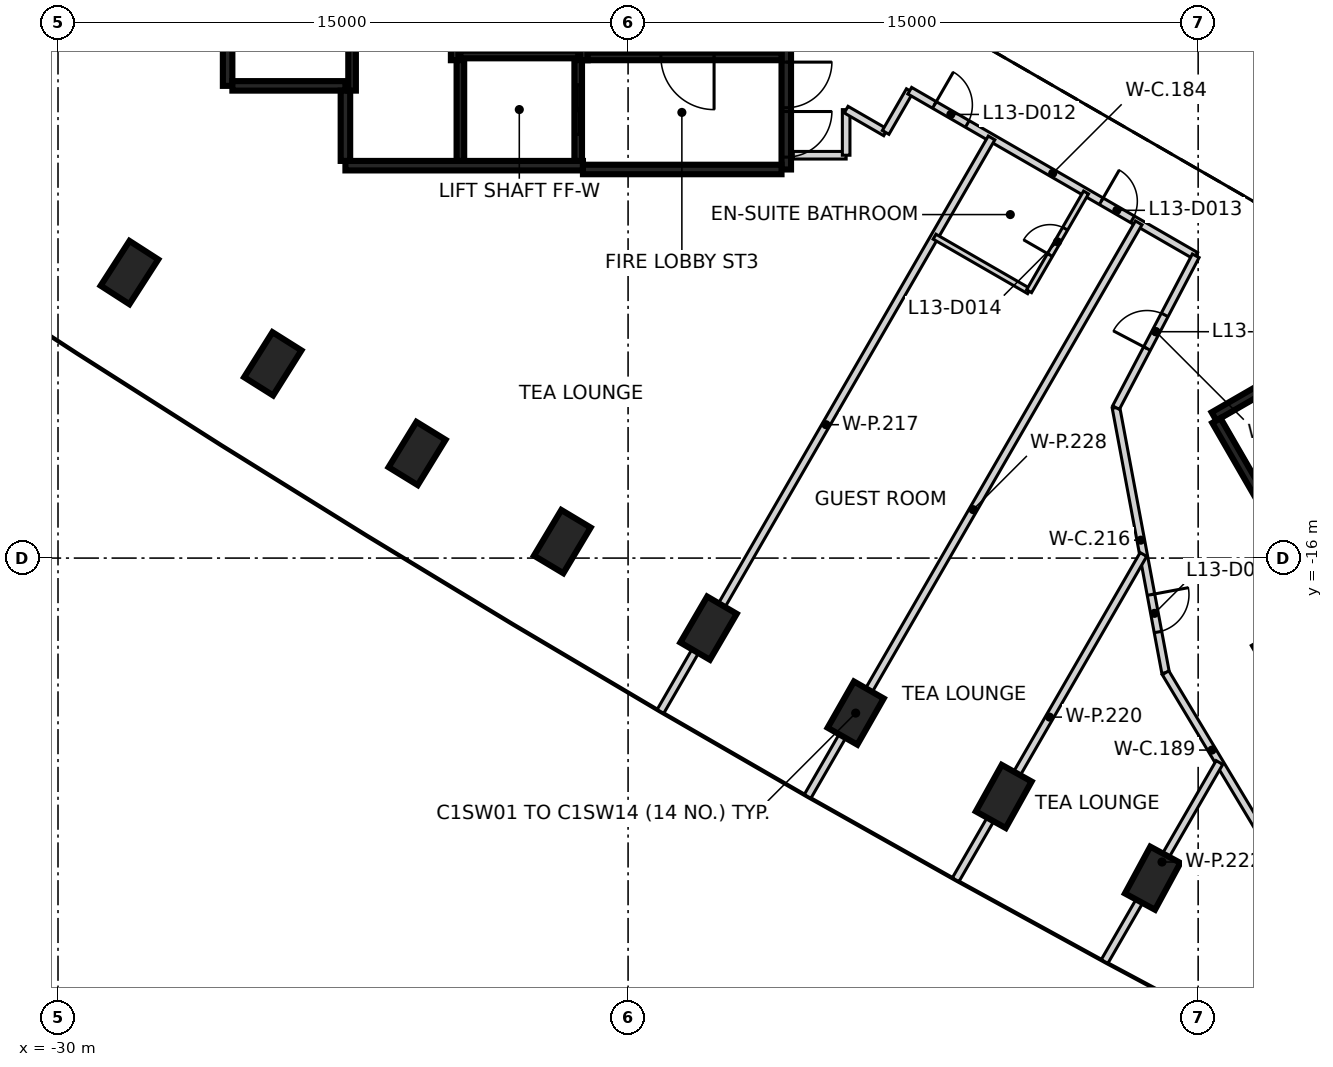
"""IFC4 building model, lengths in metres.
Left out: names, types, materials, properties, quantities, classifications, styles, units other than length and angle.
Written with IfcOpenShell. Run it as: python <this file> out.ifc"""

import sys

from ifc_helpers import new_model, si_unit, direction, frame, frame_2d, origin, origin_2d, place, context, subcontext, project, spatial, rectangle, extrude, element, fill, save


model = new_model("IFC4")
c1 = context("Model", 3, precision=1e-05, world=origin(), true_north=direction((0.0, 1.0)))
c2 = subcontext(c1, "Body", "Model", "MODEL_VIEW")
j1 = project(units=[si_unit("LENGTHUNIT", "METRE"), si_unit("PLANEANGLEUNIT", "RADIAN")], contexts=[c1])
p1 = place(None, origin())
s1 = spatial("IfcSite", under=j1, at=p1, CompositionType="ELEMENT")
p2 = place(p1, origin())
s2 = spatial("IfcBuilding", under=s1, at=p2, CompositionType="ELEMENT")
p3 = place(p2, frame((0.0, 0.0, 60.2)))
s3 = spatial("IfcBuildingStorey", under=s2, at=p3, CompositionType="ELEMENT", Elevation=60.2)
for number, where, z_axis, x_axis in (
    (1, (-28.12, -8.488, -0.475), (0.0, 0.0, 1.0), (0.541, 0.841, 0.0)),
    (2, (-24.349, -10.888, -0.475), (0.0, 0.0, 1.0), (0.532, 0.846, 0.0)),
    (3, (-20.552, -13.248, -0.475), (0.0, 0.0, 1.0), (0.523, 0.852, 0.0)),
    (4, (-16.73, -15.566, -0.475), (0.0, 0.0, 1.0), (0.514, 0.858, 0.0)),
    (5, (-12.883, -17.844, -0.475), (0.0, 0.0, 1.0), (0.505, 0.863, 0.0)),
    (6, (-9.011, -20.079, -0.475), (0.0, 0.0, 1.0), (0.495, 0.869, 0.0)),
    (7, (-5.116, -22.272, -0.475), (0.0, 0.0, 1.0), (0.486, 0.874, 0.0)),
    (8, (-1.197, -24.423, -0.475), (0.0, 0.0, 1.0), (0.476, 0.879, 0.0)),
):
    element("IfcColumn", number, at=place(p3, frame(where, z_axis=z_axis, x_axis=x_axis)), inside=s3, PredefinedType="COLUMN", context=c2, shape_type="SweptSolid", body=[
        extrude(rectangle(XDim=1.4, YDim=0.9, at=origin_2d()), origin(), (0.0, 0.0, 1.0), 3.6),
    ])
p4 = place(p3, frame((-10.837, 5.775, 0.0), z_axis=(0.0, 0.0, 1.0), x_axis=(0.0, -1.0, 0.0)))
e9 = element("IfcWall", 9, at=p4, inside=s3, PredefinedType="SHEAR", context=c2, shape_type="SweptSolid", body=[
    extrude(rectangle(XDim=11.55, YDim=0.25, at=frame_2d((5.775, 0.0))), origin(), (0.0, 0.0, 1.0), 3.125),
])
p5 = place(p4, frame((10.025, 0.0, 0.0)))
e10 = element("IfcOpeningElement", 10, at=p5, cuts=e9, PredefinedType="OPENING", context=c2, shape_type="SweptSolid", body=[
    extrude(rectangle(XDim=1.2, YDim=2.1, at=frame_2d((0.6, 1.05))), frame((0.0, 0.135, 0.0), z_axis=(0.0, -1.0, 0.0), x_axis=(1.0, 0.0, 0.0)), (0.0, 0.0, 1.0), 0.27),
])
p6 = place(p4, frame((8.725, 0.0, 0.0)))
e11 = element("IfcOpeningElement", 11, at=p6, cuts=e9, PredefinedType="OPENING", context=c2, shape_type="SweptSolid", body=[
    extrude(rectangle(XDim=1.2, YDim=2.1, at=frame_2d((0.6, 1.05))), frame((0.0, 0.135, 0.0), z_axis=(0.0, -1.0, 0.0), x_axis=(1.0, 0.0, 0.0)), (0.0, 0.0, 1.0), 0.27),
])
p7 = place(p3, frame((-16.187, -5.675, 0.0), z_axis=(0.0, 0.0, 1.0), x_axis=(-1.0, 0.0, 0.0)))
e12 = element("IfcWall", 12, at=p7, inside=s3, PredefinedType="SHEAR", context=c2, shape_type="SweptSolid", body=[
    extrude(rectangle(XDim=6.25, YDim=0.25, at=frame_2d((3.125, 0.0))), origin(), (0.0, 0.0, 1.0), 3.125),
])
p8 = place(p3, frame((-25.537, -3.575, 0.0), z_axis=(0.0, 0.0, 1.0), x_axis=(0.0, 1.0, 0.0)))
e13 = element("IfcWall", 13, at=p8, inside=s3, PredefinedType="SHEAR", context=c2, shape_type="SweptSolid", body=[
    extrude(rectangle(XDim=5.85, YDim=0.25, at=frame_2d((2.925, 0.0))), origin(), (0.0, 0.0, 1.0), 3.125),
])
p9 = place(p3, frame((-10.963, -5.775, 0.0), z_axis=(0.0, 0.0, 1.0), x_axis=(-1.0, 0.0, 0.0)))
e14 = element("IfcWall", 14, at=p9, inside=s3, PredefinedType="SHEAR", context=c2, shape_type="SweptSolid", body=[
    extrude(rectangle(XDim=5.225, YDim=0.25, at=frame_2d((2.612, 0.0))), origin(), (0.0, 0.0, 1.0), 3.125),
])
p10 = place(p3, frame((-22.437, -3.575, 0.0), z_axis=(0.0, 0.0, 1.0), x_axis=(-1.0, 0.0, 0.0)))
e15 = element("IfcWall", 15, at=p10, inside=s3, PredefinedType="SHEAR", context=c2, shape_type="SweptSolid", body=[
    extrude(rectangle(XDim=2.975, YDim=0.25, at=frame_2d((1.487, 0.0))), origin(), (0.0, 0.0, 1.0), 3.125),
])
p11 = place(p3, frame((-22.437, -5.55, 0.0), z_axis=(0.0, 0.0, 1.0), x_axis=(0.0, 1.0, 0.0)))
e16 = element("IfcWall", 16, at=p11, inside=s3, PredefinedType="SHEAR", context=c2, shape_type="SweptSolid", body=[
    extrude(rectangle(XDim=1.849, YDim=0.25, at=frame_2d((0.925, 0.0))), origin(), (0.0, 0.0, 1.0), 3.125),
])
p12 = place(p3, frame((-16.162, 2.951, 0.0), z_axis=(0.0, 0.0, 1.0), x_axis=(0.0, -1.0, 0.0)))
e17 = element("IfcWall", 17, at=p12, inside=s3, PredefinedType="SHEAR", context=c2, shape_type="SweptSolid", body=[
    extrude(rectangle(XDim=5.851, YDim=0.2, at=frame_2d((2.925, 0.0))), origin(), (0.0, 0.0, 1.0), 3.125),
])
for number, where, z_axis, x_axis in (
    (18, (-19.562, -2.9, 0.0), (0.0, 0.0, 1.0), (0.0, 1.0, 0.0)),
    (19, (-22.262, 2.4, 0.0), (0.0, 0.0, 1.0), (0.0, -1.0, 0.0)),
):
    element("IfcWall", number, at=place(p3, frame(where, z_axis=z_axis, x_axis=x_axis)), inside=s3, PredefinedType="SHEAR", context=c2, shape_type="SweptSolid", body=[
        extrude(rectangle(XDim=6.1, YDim=0.2, at=frame_2d((3.05, 0.0))), origin(), (0.0, 0.0, 1.0), 3.125),
    ])
p13 = place(p3, frame((-10.963, -2.8, 0.0), z_axis=(0.0, 0.0, 1.0), x_axis=(-1.0, 0.0, 0.0)))
e20 = element("IfcWall", 20, at=p13, inside=s3, PredefinedType="SHEAR", context=c2, shape_type="SweptSolid", body=[
    extrude(rectangle(XDim=5.098, YDim=0.2, at=frame_2d((2.549, 0.0))), origin(), (0.0, 0.0, 1.0), 3.125),
])
p14 = place(p13, frame((1.774, 0.0, 0.0)))
e21 = element("IfcOpeningElement", 21, at=p14, cuts=e20, PredefinedType="OPENING", context=c2, shape_type="SweptSolid", body=[
    extrude(rectangle(XDim=1.4, YDim=2.1, at=frame_2d((0.7, 1.05))), frame((0.0, 0.11, 0.0), z_axis=(0.0, -1.0, 0.0), x_axis=(1.0, 0.0, 0.0)), (0.0, 0.0, 1.0), 0.22),
])
p15 = place(p3, frame((-19.412, -2.75, 0.0), z_axis=(0.0, 0.0, 1.0), x_axis=(1.0, 0.0, 0.0)))
e22 = element("IfcWall", 22, at=p15, inside=s3, PredefinedType="SHEAR", context=c2, shape_type="SweptSolid", body=[
    extrude(rectangle(XDim=3.1, YDim=0.2, at=frame_2d((1.55, 0.0))), origin(), (0.0, 0.0, 1.0), 3.125),
])
p16 = place(p3, frame((-16.312, -2.898, 0.0), z_axis=(0.0, 0.0, 1.0), x_axis=(0.0, -1.0, 0.0)))
e23 = element("IfcWall", 23, at=p16, inside=s3, PredefinedType="SHEAR", context=c2, shape_type="SweptSolid", body=[
    extrude(rectangle(XDim=2.651, YDim=0.2, at=frame_2d((1.325, 0.0))), origin(), (0.0, 0.0, 1.0), 3.125),
])
p17 = place(p16, frame((0.652, 0.0, 0.0)))
e24 = element("IfcOpeningElement", 24, at=p17, cuts=e23, PredefinedType="OPENING", context=c2, shape_type="SweptSolid", body=[
    extrude(rectangle(XDim=1.3, YDim=2.1, at=frame_2d((0.65, 1.05))), frame((0.0, 0.11, 0.0), z_axis=(0.0, -1.0, 0.0), x_axis=(1.0, 0.0, 0.0)), (0.0, 0.0, 1.0), 0.22),
])
p18 = place(p3, frame((-19.412, -5.549, 0.0), z_axis=(0.0, 0.0, 1.0), x_axis=(0.0, 1.0, 0.0)))
e25 = element("IfcWall", 25, at=p18, inside=s3, PredefinedType="SHEAR", context=c2, shape_type="SweptSolid", body=[
    extrude(rectangle(XDim=2.651, YDim=0.2, at=frame_2d((1.325, 0.0))), origin(), (0.0, 0.0, 1.0), 3.125),
])
p19 = place(p3, frame((0.417, -12.273, 0.0), z_axis=(0.0, 0.0, 1.0), x_axis=(0.866021906294, 0.500006057782, 0.0)))
e26 = element("IfcWall", 26, at=p19, inside=s3, PredefinedType="SHEAR", context=c2, shape_type="SweptSolid", body=[
    extrude(rectangle(XDim=11.55, YDim=0.25, at=frame_2d((5.775, 0.0))), origin(), (0.0, 0.0, 1.0), 3.125),
])
p20 = place(p19, frame((10.025, 0.0, 0.0)))
e27 = element("IfcOpeningElement", 27, at=p20, cuts=e26, PredefinedType="OPENING", context=c2, shape_type="SweptSolid", body=[
    extrude(rectangle(XDim=1.2, YDim=2.1, at=frame_2d((0.6, 1.05))), frame((0.0, 0.135, 0.0), z_axis=(0.0, -1.0, 0.0), x_axis=(1.0, 0.0, 0.0)), (0.0, 0.0, 1.0), 0.27),
])
p21 = place(p19, frame((8.725, 0.0, 0.0)))
e28 = element("IfcOpeningElement", 28, at=p21, cuts=e26, PredefinedType="OPENING", context=c2, shape_type="SweptSolid", body=[
    extrude(rectangle(XDim=1.2, YDim=2.1, at=frame_2d((0.6, 1.05))), frame((0.0, 0.135, 0.0), z_axis=(0.0, -1.0, 0.0), x_axis=(1.0, 0.0, 0.0)), (0.0, 0.0, 1.0), 0.27),
])
p22 = place(p3, frame((3.235, -17.153, 0.0), z_axis=(0.0, 0.0, 1.0), x_axis=(-0.500008851346, 0.866020293397, 0.0)))
e29 = element("IfcWall", 29, at=p22, inside=s3, PredefinedType="SHEAR", context=c2, shape_type="SweptSolid", body=[
    extrude(rectangle(XDim=5.51, YDim=0.25, at=frame_2d((2.755, 0.0))), origin(), (0.0, 0.0, 1.0), 3.125),
])
p23 = place(p3, frame((-10.652, -5.4, 0.0), z_axis=(0.0, 0.0, 1.0), x_axis=(1.0, 0.0, 0.0)))
e30 = element("IfcWall", 30, at=p23, inside=s3, PredefinedType="PARTITIONING", context=c2, shape_type="SweptSolid", body=[
    extrude(rectangle(XDim=1.39, YDim=0.2, at=frame_2d((0.695, 0.0))), origin(), (0.0, 0.0, 1.0), 3.125),
])
for number, where, z_axis, x_axis in (
    (31, (-9.262, -5.4, 0.0), (0.0, 0.0, 1.0), (0.0, 1.0, 0.0)),
    (32, (-9.262, -4.2, 0.0), (0.0, 0.0, 1.0), (0.866, -0.5, 0.0)),
):
    element("IfcWall", number, at=place(p3, frame(where, z_axis=z_axis, x_axis=x_axis)), inside=s3, PredefinedType="PARTITIONING", context=c2, shape_type="SweptSolid", body=[
        extrude(rectangle(XDim=1.2, YDim=0.2, at=frame_2d((0.6, 0.0))), origin(), (0.0, 0.0, 1.0), 3.125),
    ])
p24 = place(p3, frame((-8.223, -4.8, 0.0), z_axis=(0.0, 0.0, 1.0), x_axis=(0.499866914522, 0.866102227088, 0.0)))
e33 = element("IfcWall", 33, at=p24, inside=s3, PredefinedType="PARTITIONING", context=c2, shape_type="SweptSolid", body=[
    extrude(rectangle(XDim=1.268, YDim=0.2, at=frame_2d((0.634, 0.0))), origin(), (0.0, 0.0, 1.0), 3.125),
])
p25 = place(p3, frame((-7.589, -3.702, 0.0), z_axis=(0.0, 0.0, 1.0), x_axis=(0.865995139556, -0.500052415518, 0.0)))
e34 = element("IfcWall", 34, at=p25, inside=s3, PredefinedType="PARTITIONING", context=c2, shape_type="SweptSolid", body=[
    extrude(rectangle(XDim=8.689, YDim=0.2, at=frame_2d((4.344, 0.0))), origin(), (0.0, 0.0, 1.0), 3.125),
])
p26 = place(p25, frame((0.749, 0.0, 0.0)))
e35 = element("IfcOpeningElement", 35, at=p26, cuts=e34, PredefinedType="OPENING", context=c2, shape_type="SweptSolid", body=[
    extrude(rectangle(XDim=1.0, YDim=2.1, at=frame_2d((0.5, 1.05))), frame((0.0, 0.11, 0.0), z_axis=(0.0, -1.0, 0.0), x_axis=(1.0, 0.0, 0.0)), (0.0, 0.0, 1.0), 0.22),
])
p27 = place(p25, frame((5.819, 0.0, 0.0)))
e36 = element("IfcOpeningElement", 36, at=p27, cuts=e34, PredefinedType="OPENING", context=c2, shape_type="SweptSolid", body=[
    extrude(rectangle(XDim=0.95, YDim=2.1, at=frame_2d((0.475, 1.05))), frame((0.0, 0.11, 0.0), z_axis=(0.0, -1.0, 0.0), x_axis=(1.0, 0.0, 0.0)), (0.0, 0.0, 1.0), 0.22),
])
p28 = place(p3, frame((-2.162, -12.042, 0.0), z_axis=(0.0, 0.0, 1.0), x_axis=(0.183949825522, -0.982935634561, 0.0)))
e37 = element("IfcWall", 37, at=p28, inside=s3, PredefinedType="PARTITIONING", context=c2, shape_type="SweptSolid", body=[
    extrude(rectangle(XDim=7.094, YDim=0.2, at=frame_2d((3.547, 0.0))), origin(), (0.0, 0.0, 1.0), 3.125),
])
p29 = place(p28, frame((5.006, 0.0, 0.0)))
e38 = element("IfcOpeningElement", 38, at=p29, cuts=e37, PredefinedType="OPENING", context=c2, shape_type="SweptSolid", body=[
    extrude(rectangle(XDim=1.0, YDim=2.1, at=frame_2d((0.5, 1.05))), frame((0.0, 0.11, 0.0), z_axis=(0.0, -1.0, 0.0), x_axis=(1.0, 0.0, 0.0)), (0.0, 0.0, 1.0), 0.22),
])
p30 = place(p3, frame((-2.162, -12.041, 0.0), z_axis=(0.0, 0.0, 1.0), x_axis=(0.464956890881, 0.885333321197, 0.0)))
e39 = element("IfcWall", 39, at=p30, inside=s3, PredefinedType="PARTITIONING", context=c2, shape_type="SweptSolid", body=[
    extrude(rectangle(XDim=4.512, YDim=0.2, at=frame_2d((2.256, 0.0))), origin(), (0.0, 0.0, 1.0), 3.125),
])
p31 = place(p30, frame((1.756, 0.0, 0.0)))
e40 = element("IfcOpeningElement", 40, at=p31, cuts=e39, PredefinedType="OPENING", context=c2, shape_type="SweptSolid", body=[
    extrude(rectangle(XDim=1.0, YDim=2.1, at=frame_2d((0.5, 1.05))), frame((0.0, 0.11, 0.0), z_axis=(0.0, -1.0, 0.0), x_axis=(1.0, 0.0, 0.0)), (0.0, 0.0, 1.0), 0.22),
])
p32 = place(p3, frame((-0.858, -19.017, 0.0), z_axis=(0.0, 0.0, 1.0), x_axis=(0.514647068805, -0.857402119528, 0.0)))
e41 = element("IfcWall", 41, at=p32, inside=s3, PredefinedType="PARTITIONING", context=c2, shape_type="SweptSolid", body=[
    extrude(rectangle(XDim=4.745, YDim=0.2, at=frame_2d((2.373, 0.0))), origin(), (0.0, 0.0, 1.0), 3.125),
])
p33 = place(p3, frame((-14.148, -20.035, 0.0), z_axis=(0.0, 0.0, 1.0), x_axis=(0.500005855417, 0.866022023131, 0.0)))
e42 = element("IfcWall", 42, at=p33, inside=s3, PredefinedType="PARTITIONING", context=c2, shape_type="SweptSolid", body=[
    extrude(rectangle(XDim=17.425, YDim=0.2, at=frame_2d((8.712, 0.0))), origin(), (0.0, 0.0, 1.0), 3.125),
])
p34 = place(p3, frame((-10.276, -22.271, 0.0), z_axis=(0.0, 0.0, 1.0), x_axis=(0.49999372146, 0.866029028671, 0.0)))
e43 = element("IfcWall", 43, at=p34, inside=s3, PredefinedType="PARTITIONING", context=c2, shape_type="SweptSolid", body=[
    extrude(rectangle(XDim=17.425, YDim=0.2, at=frame_2d((8.712, 0.0))), origin(), (0.0, 0.0, 1.0), 3.125),
])
p35 = place(p3, frame((-6.381, -24.464, 0.0), z_axis=(0.0, 0.0, 1.0), x_axis=(0.500007577232, 0.866021029023, 0.0)))
e44 = element("IfcWall", 44, at=p35, inside=s3, PredefinedType="PARTITIONING", context=c2, shape_type="SweptSolid", body=[
    extrude(rectangle(XDim=9.883, YDim=0.2, at=frame_2d((4.941, 0.0))), origin(), (0.0, 0.0, 1.0), 3.125),
])
p36 = place(p3, frame((-2.462, -26.615, 0.0), z_axis=(0.0, 0.0, 1.0), x_axis=(0.49992636536, 0.86606791259, 0.0)))
e45 = element("IfcWall", 45, at=p36, inside=s3, PredefinedType="PARTITIONING", context=c2, shape_type="SweptSolid", body=[
    extrude(rectangle(XDim=6.046, YDim=0.2, at=frame_2d((3.023, 0.0))), origin(), (0.0, 0.0, 1.0), 3.125),
])
p37 = place(p3, frame((-6.936, -7.543, 0.0), z_axis=(0.0, 0.0, 1.0), x_axis=(0.866153027342, -0.499778884334, 0.0)))
e46 = element("IfcWall", 46, at=p37, inside=s3, PredefinedType="PARTITIONING", context=c2, shape_type="SweptSolid", body=[
    extrude(rectangle(XDim=2.871, YDim=0.15, at=frame_2d((1.436, 0.0))), origin(), (0.0, 0.0, 1.0), 3.125),
])
p38 = place(p3, frame((-4.449, -8.978, 0.0), z_axis=(0.0, 0.0, 1.0), x_axis=(0.499745940409, 0.866172035478, 0.0)))
e47 = element("IfcWall", 47, at=p38, inside=s3, PredefinedType="PARTITIONING", context=c2, shape_type="SweptSolid", body=[
    extrude(rectangle(XDim=3.0, YDim=0.15, at=frame_2d((1.5, 0.0))), origin(), (0.0, 0.0, 1.0), 3.125),
])
p39 = place(p38, frame((1.1, 0.0, 0.0)))
e48 = element("IfcOpeningElement", 48, at=p39, cuts=e47, PredefinedType="OPENING", context=c2, shape_type="SweptSolid", body=[
    extrude(rectangle(XDim=0.8, YDim=2.1, at=frame_2d((0.4, 1.05))), frame((0.0, 0.085, 0.0), z_axis=(0.0, -1.0, 0.0), x_axis=(1.0, 0.0, 0.0)), (0.0, 0.0, 1.0), 0.17),
])
p40 = place(p17, origin())
e49 = element("IfcDoor", 49, at=p40, inside=s3, OperationType="SLIDING_TO_LEFT", PredefinedType="DOOR", context=c2, shape_type="SweptSolid", body=[
    extrude(rectangle(XDim=1.3, YDim=2.1, at=frame_2d((0.65, 1.05))), frame((0.0, 0.025, 0.0), z_axis=(0.0, -1.0, 0.0), x_axis=(1.0, 0.0, 0.0)), (0.0, 0.0, 1.0), 0.05),
])
fill(e24, e49)
p41 = place(p5, origin())
e50 = element("IfcDoor", 50, at=p41, inside=s3, OperationType="SINGLE_SWING_LEFT", PredefinedType="DOOR", context=c2, shape_type="SweptSolid", body=[
    extrude(rectangle(XDim=1.2, YDim=2.1, at=frame_2d((0.6, 1.05))), frame((0.0, 0.025, 0.0), z_axis=(0.0, -1.0, 0.0), x_axis=(1.0, 0.0, 0.0)), (0.0, 0.0, 1.0), 0.05),
])
fill(e10, e50)
p42 = place(p6, origin())
e51 = element("IfcDoor", 51, at=p42, inside=s3, OperationType="SINGLE_SWING_RIGHT", PredefinedType="DOOR", context=c2, shape_type="SweptSolid", body=[
    extrude(rectangle(XDim=1.2, YDim=2.1, at=frame_2d((0.6, 1.05))), frame((0.0, 0.025, 0.0), z_axis=(0.0, -1.0, 0.0), x_axis=(1.0, 0.0, 0.0)), (0.0, 0.0, 1.0), 0.05),
])
fill(e11, e51)
p43 = place(p14, origin())
e52 = element("IfcDoor", 52, at=p43, inside=s3, OperationType="SINGLE_SWING_LEFT", PredefinedType="DOOR", context=c2, shape_type="SweptSolid", body=[
    extrude(rectangle(XDim=1.4, YDim=2.1, at=frame_2d((0.7, 1.05))), frame((0.0, 0.025, 0.0), z_axis=(0.0, -1.0, 0.0), x_axis=(1.0, 0.0, 0.0)), (0.0, 0.0, 1.0), 0.05),
])
fill(e21, e52)
p44 = place(p26, frame((1.0, 0.0, 0.0), z_axis=(0.0, 0.0, 1.0), x_axis=(-1.0, 0.0, 0.0)))
e53 = element("IfcDoor", 53, at=p44, inside=s3, OperationType="SINGLE_SWING_LEFT", PredefinedType="DOOR", context=c2, shape_type="SweptSolid", body=[
    extrude(rectangle(XDim=1.0, YDim=2.1, at=frame_2d((0.5, 1.05))), frame((0.0, 0.025, 0.0), z_axis=(0.0, -1.0, 0.0), x_axis=(1.0, 0.0, 0.0)), (0.0, 0.0, 1.0), 0.05),
])
fill(e35, e53)
p45 = place(p27, frame((0.95, 0.0, 0.0), z_axis=(0.0, 0.0, 1.0), x_axis=(-1.0, 0.0, 0.0)))
e54 = element("IfcDoor", 54, at=p45, inside=s3, OperationType="SINGLE_SWING_LEFT", PredefinedType="DOOR", context=c2, shape_type="SweptSolid", body=[
    extrude(rectangle(XDim=0.95, YDim=2.1, at=frame_2d((0.475, 1.05))), frame((0.0, 0.025, 0.0), z_axis=(0.0, -1.0, 0.0), x_axis=(1.0, 0.0, 0.0)), (0.0, 0.0, 1.0), 0.05),
])
fill(e36, e54)
p46 = place(p39, origin())
e55 = element("IfcDoor", 55, at=p46, inside=s3, OperationType="SINGLE_SWING_LEFT", PredefinedType="DOOR", context=c2, shape_type="SweptSolid", body=[
    extrude(rectangle(XDim=0.8, YDim=2.1, at=frame_2d((0.4, 1.05))), frame((0.0, 0.025, 0.0), z_axis=(0.0, -1.0, 0.0), x_axis=(1.0, 0.0, 0.0)), (0.0, 0.0, 1.0), 0.05),
])
fill(e48, e55)
p47 = place(p31, origin())
e56 = element("IfcDoor", 56, at=p47, inside=s3, OperationType="SINGLE_SWING_LEFT", PredefinedType="DOOR", context=c2, shape_type="SweptSolid", body=[
    extrude(rectangle(XDim=1.0, YDim=2.1, at=frame_2d((0.5, 1.05))), frame((0.0, 0.025, 0.0), z_axis=(0.0, -1.0, 0.0), x_axis=(1.0, 0.0, 0.0)), (0.0, 0.0, 1.0), 0.05),
])
fill(e40, e56)
p48 = place(p29, frame((1.0, 0.0, 0.0), z_axis=(0.0, 0.0, 1.0), x_axis=(-1.0, 0.0, 0.0)))
e57 = element("IfcDoor", 57, at=p48, inside=s3, OperationType="SINGLE_SWING_LEFT", PredefinedType="DOOR", context=c2, shape_type="SweptSolid", body=[
    extrude(rectangle(XDim=1.0, YDim=2.1, at=frame_2d((0.5, 1.05))), frame((0.0, 0.025, 0.0), z_axis=(0.0, -1.0, 0.0), x_axis=(1.0, 0.0, 0.0)), (0.0, 0.0, 1.0), 0.05),
])
fill(e38, e57)
save(model, sys.argv[1])
